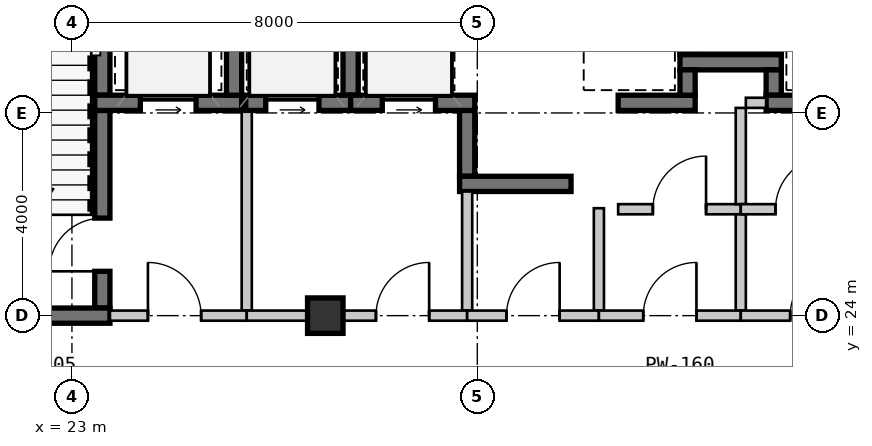
"""IFC4 building model, lengths in metres.
Left out: names, types, materials, properties, quantities, classifications, styles, units other than length and angle.
Written with IfcOpenShell. Run it as: python <this file> out.ifc"""

import sys

from ifc_helpers import new_model, si_unit, direction, frame, frame_2d, origin, origin_2d, place, context, subcontext, project, spatial, rectangle, extrude, source, transform, mapped, element, fill, save


model = new_model("IFC4")
c1 = context("Model", 3, precision=1e-05, world=origin(), true_north=direction((0.0, 1.0)))
c2 = subcontext(c1, "Body", "Model", "MODEL_VIEW")
j1 = project(units=[si_unit("LENGTHUNIT", "METRE"), si_unit("PLANEANGLEUNIT", "RADIAN")], contexts=[c1])
p1 = place(None, origin())
s1 = spatial("IfcSite", under=j1, at=p1, CompositionType="ELEMENT")
p2 = place(p1, origin())
s2 = spatial("IfcBuilding", under=s1, at=p2, CompositionType="ELEMENT")
p3 = place(p2, frame((0.0, 0.0, 65.1)))
s3 = spatial("IfcBuildingStorey", under=s2, at=p3, CompositionType="ELEMENT", Elevation=65.1)
m1 = source(origin(), c2, "Body", "SweptSolid", [
    extrude(rectangle(XDim=0.7, YDim=0.7, at=origin_2d()), origin(), (0.0, 0.0, 1.0), 3.15),
])
p4 = place(p3, frame((28.0, 24.0, 0.0), z_axis=(0.0, 0.0, 1.0), x_axis=(1.0, 0.0, 0.0)))
e1 = element("IfcColumn", 1, at=p4, inside=s3, PredefinedType="COLUMN", context=c2, shape_type="MappedRepresentation", body=[
    mapped(m1, transform((0.0, 0.0, 0.0), scale=1.0)),
])
m2 = source(origin(), c2, "Body", "SweptSolid", [
    extrude(rectangle(XDim=3.5, YDim=0.3, at=frame_2d((1.75, 0.0))), origin(), (0.0, 0.0, 1.0), 2.93),
])
p5 = place(p3, frame((23.6, 28.35, 0.0), z_axis=(0.0, 0.0, 1.0), x_axis=(0.0, 1.0, 0.0)))
e2 = element("IfcWall", 2, at=p5, inside=s3, PredefinedType="SHEAR", context=c2, shape_type="MappedRepresentation", body=[
    mapped(m2, transform((0.0, 0.0, 0.0), scale=1.0)),
])
m3 = source(origin(), c2, "Body", "SweptSolid", [
    extrude(rectangle(XDim=3.9, YDim=0.3, at=frame_2d((1.95, 0.0))), origin(), (0.0, 0.0, 1.0), 2.93),
])
p6 = place(p3, frame((23.6, 24.15, 0.0), z_axis=(0.0, 0.0, 1.0), x_axis=(0.0, 1.0, 0.0)))
e3 = element("IfcWall", 3, at=p6, inside=s3, PredefinedType="SHEAR", context=c2, shape_type="MappedRepresentation", body=[
    mapped(m3, transform((0.0, 0.0, 0.0), scale=1.0)),
])
m4 = source(origin(), c2, "Body", "SweptSolid", [
    extrude(rectangle(XDim=1.05, YDim=2.1, at=frame_2d((0.525, 1.05))), frame((0.0, 0.16, 0.0), z_axis=(0.0, -1.0, 0.0), x_axis=(1.0, 0.0, 0.0)), (0.0, 0.0, 1.0), 0.32),
])
p7 = place(p6, frame((0.725, 0.0, 0.0)))
e4 = element("IfcOpeningElement", 4, at=p7, cuts=e3, PredefinedType="OPENING", context=c2, shape_type="MappedRepresentation", body=[
    mapped(m4, transform((0.0, 0.0, 0.0), scale=1.0)),
])
m5 = source(origin(), c2, "Body", "SweptSolid", [
    extrude(rectangle(XDim=4.9, YDim=0.3, at=frame_2d((2.45, 0.0))), origin(), (0.0, 0.0, 1.0), 2.93),
])
p8 = place(p3, frame((18.85, 24.0, 0.0), z_axis=(0.0, 0.0, 1.0), x_axis=(1.0, 0.0, 0.0)))
e5 = element("IfcWall", 5, at=p8, inside=s3, PredefinedType="SHEAR", context=c2, shape_type="MappedRepresentation", body=[
    mapped(m5, transform((0.0, 0.0, 0.0), scale=1.0)),
])
m6 = source(origin(), c2, "Body", "SweptSolid", [
    extrude(rectangle(XDim=2.9, YDim=0.3, at=frame_2d((1.45, 0.0))), origin(), (0.0, 0.0, 1.0), 2.93),
])
p9 = place(p3, frame((23.45, 28.2, 0.0), z_axis=(0.0, 0.0, 1.0), x_axis=(1.0, 0.0, 0.0)))
e6 = element("IfcWall", 6, at=p9, inside=s3, PredefinedType="SHEAR", context=c2, shape_type="MappedRepresentation", body=[
    mapped(m6, transform((0.0, 0.0, 0.0), scale=1.0)),
])
m7 = source(origin(), c2, "Body", "SweptSolid", [
    extrude(rectangle(XDim=1.1, YDim=2.15, at=frame_2d((0.55, 1.075))), frame((0.0, 0.16, 0.0), z_axis=(0.0, -1.0, 0.0), x_axis=(1.0, 0.0, 0.0)), (0.0, 0.0, 1.0), 0.32),
])
p10 = place(p9, frame((0.9, 0.0, 0.0)))
e7 = element("IfcOpeningElement", 7, at=p10, cuts=e6, PredefinedType="OPENING", context=c2, shape_type="MappedRepresentation", body=[
    mapped(m7, transform((0.0, 0.0, 0.0), scale=1.0)),
])
p11 = place(p3, frame((26.2, 28.35, 0.0), z_axis=(0.0, 0.0, 1.0), x_axis=(0.0, 1.0, 0.0)))
e8 = element("IfcWall", 8, at=p11, inside=s3, PredefinedType="SHEAR", context=c2, shape_type="MappedRepresentation", body=[
    mapped(m2, transform((0.0, 0.0, 0.0), scale=1.0)),
])
m8 = source(origin(), c2, "Body", "SweptSolid", [
    extrude(rectangle(XDim=3.95, YDim=0.2, at=frame_2d((1.975, 0.0))), origin(), (0.0, 0.0, 1.0), 2.93),
])
p12 = place(p3, frame((26.45, 24.1, 0.0), z_axis=(0.0, 0.0, 1.0), x_axis=(0.0, 1.0, 0.0)))
e9 = element("IfcWall", 9, at=p12, inside=s3, PredefinedType="SOLIDWALL", context=c2, shape_type="MappedRepresentation", body=[
    mapped(m8, transform((0.0, 0.0, 0.0), scale=1.0)),
])
m9 = source(origin(), c2, "Body", "SweptSolid", [
    extrude(rectangle(XDim=2.7, YDim=0.2, at=frame_2d((1.35, 0.0))), origin(), (0.0, 0.0, 1.0), 2.47),
])
p13 = place(p3, frame((23.75, 24.0, 0.0), z_axis=(0.0, 0.0, 1.0), x_axis=(1.0, 0.0, 0.0)))
e10 = element("IfcWall", 10, at=p13, inside=s3, PredefinedType="SOLIDWALL", context=c2, shape_type="MappedRepresentation", body=[
    mapped(m9, transform((0.0, 0.0, 0.0), scale=1.0)),
])
m10 = source(origin(), c2, "Body", "SweptSolid", [
    extrude(rectangle(XDim=1.05, YDim=2.1, at=frame_2d((0.525, 1.05))), frame((0.0, 0.11, 0.0), z_axis=(0.0, -1.0, 0.0), x_axis=(1.0, 0.0, 0.0)), (0.0, 0.0, 1.0), 0.22),
])
p14 = place(p13, frame((0.75, 0.0, 0.0)))
e11 = element("IfcOpeningElement", 11, at=p14, cuts=e10, PredefinedType="OPENING", context=c2, shape_type="MappedRepresentation", body=[
    mapped(m10, transform((0.0, 0.0, 0.0), scale=1.0)),
])
m11 = source(origin(), c2, "Body", "SweptSolid", [
    extrude(rectangle(XDim=1.2, YDim=0.3, at=frame_2d((0.6, 0.0))), origin(), (0.0, 0.0, 1.0), 2.93),
])
for number, where, z_axis, x_axis in (
    (12, (35.15, 30.35, 0.0), (0.0, 0.0, 1.0), (0.0, -1.0, 0.0)),
    (13, (36.85, 29.15, 0.0), (0.0, 0.0, 1.0), (0.0, 1.0, 0.0)),
):
    element("IfcWall", number, at=place(p3, frame(where, z_axis=z_axis, x_axis=x_axis)), inside=s3, PredefinedType="SHEAR", context=c2, shape_type="MappedRepresentation", body=[
        mapped(m11, transform((0.0, 0.0, 0.0), scale=1.0)),
    ])
m12 = source(origin(), c2, "Body", "SweptSolid", [
    extrude(rectangle(XDim=2.0, YDim=0.3, at=frame_2d((1.0, 0.0))), origin(), (0.0, 0.0, 1.0), 2.93),
])
p15 = place(p3, frame((35.0, 29.0, 0.0), z_axis=(0.0, 0.0, 1.0), x_axis=(1.0, 0.0, 0.0)))
e14 = element("IfcWall", 14, at=p15, inside=s3, PredefinedType="SHEAR", context=c2, shape_type="MappedRepresentation", body=[
    mapped(m12, transform((0.0, 0.0, 0.0), scale=1.0)),
])
m13 = source(origin(), c2, "Body", "SweptSolid", [
    extrude(rectangle(XDim=1.3, YDim=0.3, at=frame_2d((0.65, 0.0))), origin(), (0.0, 0.0, 1.0), 2.93),
])
p16 = place(p3, frame((30.8, 28.05, 0.0), z_axis=(0.0, 0.0, 1.0), x_axis=(0.0, -1.0, 0.0)))
e15 = element("IfcWall", 15, at=p16, inside=s3, PredefinedType="SHEAR", context=c2, shape_type="MappedRepresentation", body=[
    mapped(m13, transform((0.0, 0.0, 0.0), scale=1.0)),
])
m14 = source(origin(), c2, "Body", "SweptSolid", [
    extrude(rectangle(XDim=2.2, YDim=0.3, at=frame_2d((1.1, 0.0))), origin(), (0.0, 0.0, 1.0), 2.93),
])
p17 = place(p3, frame((30.65, 26.6, 0.0), z_axis=(0.0, 0.0, 1.0), x_axis=(1.0, 0.0, 0.0)))
e16 = element("IfcWall", 16, at=p17, inside=s3, PredefinedType="SHEAR", context=c2, shape_type="MappedRepresentation", body=[
    mapped(m14, transform((0.0, 0.0, 0.0), scale=1.0)),
])
p18 = place(p3, frame((28.5, 28.35, 0.0), z_axis=(0.0, 0.0, 1.0), x_axis=(0.0, 1.0, 0.0)))
e17 = element("IfcWall", 17, at=p18, inside=s3, PredefinedType="SHEAR", context=c2, shape_type="MappedRepresentation", body=[
    mapped(m2, transform((0.0, 0.0, 0.0), scale=1.0)),
])
m15 = source(origin(), c2, "Body", "SweptSolid", [
    extrude(rectangle(XDim=2.07, YDim=0.3, at=frame_2d((1.035, 0.0))), origin(), (0.0, 0.0, 1.0), 2.93),
])
p19 = place(p3, frame((26.43, 28.2, 0.0), z_axis=(0.0, 0.0, 1.0), x_axis=(1.0, 0.0, 0.0)))
e18 = element("IfcWall", 18, at=p19, inside=s3, PredefinedType="SHEAR", context=c2, shape_type="MappedRepresentation", body=[
    mapped(m15, transform((0.0, 0.0, 0.0), scale=1.0)),
])
m16 = source(origin(), c2, "Body", "SweptSolid", [
    extrude(rectangle(XDim=1.05, YDim=2.15, at=frame_2d((0.525, 1.075))), frame((0.0, 0.16, 0.0), z_axis=(0.0, -1.0, 0.0), x_axis=(1.0, 0.0, 0.0)), (0.0, 0.0, 1.0), 0.32),
])
p20 = place(p19, frame((0.395, 0.0, 0.0)))
e19 = element("IfcOpeningElement", 19, at=p20, cuts=e18, PredefinedType="OPENING", context=c2, shape_type="MappedRepresentation", body=[
    mapped(m16, transform((0.0, 0.0, 0.0), scale=1.0)),
])
m17 = source(origin(), c2, "Body", "SweptSolid", [
    extrude(rectangle(XDim=2.45, YDim=0.3, at=frame_2d((1.225, 0.0))), origin(), (0.0, 0.0, 1.0), 2.93),
])
p21 = place(p3, frame((28.5, 28.2, 0.0), z_axis=(0.0, 0.0, 1.0), x_axis=(1.0, 0.0, 0.0)))
e20 = element("IfcWall", 20, at=p21, inside=s3, PredefinedType="SHEAR", context=c2, shape_type="MappedRepresentation", body=[
    mapped(m17, transform((0.0, 0.0, 0.0), scale=1.0)),
])
p22 = place(p21, frame((0.625, 0.0, 0.0)))
e21 = element("IfcOpeningElement", 21, at=p22, cuts=e20, PredefinedType="OPENING", context=c2, shape_type="MappedRepresentation", body=[
    mapped(m16, transform((0.0, 0.0, 0.0), scale=1.0)),
])
m18 = source(origin(), c2, "Body", "SweptSolid", [
    extrude(rectangle(XDim=2.35, YDim=0.2, at=frame_2d((1.175, 0.0))), origin(), (0.0, 0.0, 1.0), 2.93),
])
p23 = place(p3, frame((30.8, 26.45, 0.0), z_axis=(0.0, 0.0, 1.0), x_axis=(0.0, -1.0, 0.0)))
e22 = element("IfcWall", 22, at=p23, inside=s3, PredefinedType="SOLIDWALL", context=c2, shape_type="MappedRepresentation", body=[
    mapped(m18, transform((0.0, 0.0, 0.0), scale=1.0)),
])
m19 = source(origin(), c2, "Body", "SweptSolid", [
    extrude(rectangle(XDim=4.35, YDim=0.2, at=frame_2d((2.175, 0.0))), origin(), (0.0, 0.0, 1.0), 2.47),
])
p24 = place(p3, frame((30.8, 24.0, 0.0), z_axis=(0.0, 0.0, 1.0), x_axis=(-1.0, 0.0, 0.0)))
e23 = element("IfcWall", 23, at=p24, inside=s3, PredefinedType="SOLIDWALL", context=c2, shape_type="MappedRepresentation", body=[
    mapped(m19, transform((0.0, 0.0, 0.0), scale=1.0)),
])
p25 = place(p24, frame((0.75, 0.0, 0.0)))
e24 = element("IfcOpeningElement", 24, at=p25, cuts=e23, PredefinedType="OPENING", context=c2, shape_type="MappedRepresentation", body=[
    mapped(m10, transform((0.0, 0.0, 0.0), scale=1.0)),
])
m20 = source(origin(), c2, "Body", "SweptSolid", [
    extrude(rectangle(XDim=1.52, YDim=0.3, at=frame_2d((0.76, 0.0))), origin(), (0.0, 0.0, 1.0), 2.93),
])
p26 = place(p3, frame((33.78, 28.2, 0.0), z_axis=(0.0, 0.0, 1.0), x_axis=(1.0, 0.0, 0.0)))
e25 = element("IfcWall", 25, at=p26, inside=s3, PredefinedType="SHEAR", context=c2, shape_type="MappedRepresentation", body=[
    mapped(m20, transform((0.0, 0.0, 0.0), scale=1.0)),
])
m21 = source(origin(), c2, "Body", "SweptSolid", [
    extrude(rectangle(XDim=0.5, YDim=0.3, at=frame_2d((0.25, 0.0))), origin(), (0.0, 0.0, 1.0), 2.93),
])
for number, where, z_axis, x_axis in (
    (26, (35.15, 28.35, 0.0), (0.0, 0.0, 1.0), (0.0, 1.0, 0.0)),
    (27, (36.85, 28.85, 0.0), (0.0, 0.0, 1.0), (0.0, -1.0, 0.0)),
):
    element("IfcWall", number, at=place(p3, frame(where, z_axis=z_axis, x_axis=x_axis)), inside=s3, PredefinedType="SHEAR", context=c2, shape_type="MappedRepresentation", body=[
        mapped(m21, transform((0.0, 0.0, 0.0), scale=1.0)),
    ])
m22 = source(origin(), c2, "Body", "SweptSolid", [
    extrude(rectangle(XDim=1.92, YDim=0.3, at=frame_2d((0.96, 0.0))), origin(), (0.0, 0.0, 1.0), 2.93),
])
p27 = place(p3, frame((36.7, 28.2, 0.0), z_axis=(0.0, 0.0, 1.0), x_axis=(1.0, 0.0, 0.0)))
e28 = element("IfcWall", 28, at=p27, inside=s3, PredefinedType="SHEAR", context=c2, shape_type="MappedRepresentation", body=[
    mapped(m22, transform((0.0, 0.0, 0.0), scale=1.0)),
])
m23 = source(origin(), c2, "Body", "SweptSolid", [
    extrude(rectangle(XDim=2.02, YDim=0.2, at=frame_2d((1.01, 0.0))), origin(), (0.0, 0.0, 1.0), 2.93),
])
p28 = place(p3, frame((33.4, 26.12, 0.0), z_axis=(0.0, 0.0, 1.0), x_axis=(0.0, -1.0, 0.0)))
e29 = element("IfcWall", 29, at=p28, inside=s3, PredefinedType="SOLIDWALL", context=c2, shape_type="MappedRepresentation", body=[
    mapped(m23, transform((0.0, 0.0, 0.0), scale=1.0)),
])
m24 = source(origin(), c2, "Body", "SweptSolid", [
    extrude(rectangle(XDim=2.6, YDim=0.2, at=frame_2d((1.3, 0.0))), origin(), (0.0, 0.0, 1.0), 2.47),
])
p29 = place(p3, frame((33.4, 24.0, 0.0), z_axis=(0.0, 0.0, 1.0), x_axis=(-1.0, 0.0, 0.0)))
e30 = element("IfcWall", 30, at=p29, inside=s3, PredefinedType="SOLIDWALL", context=c2, shape_type="MappedRepresentation", body=[
    mapped(m24, transform((0.0, 0.0, 0.0), scale=1.0)),
])
p30 = place(p29, frame((0.775, 0.0, 0.0)))
e31 = element("IfcOpeningElement", 31, at=p30, cuts=e30, PredefinedType="OPENING", context=c2, shape_type="MappedRepresentation", body=[
    mapped(m10, transform((0.0, 0.0, 0.0), scale=1.0)),
])
m25 = source(origin(), c2, "Body", "SweptSolid", [
    extrude(rectangle(XDim=2.42, YDim=0.2, at=frame_2d((1.21, 0.0))), origin(), (0.0, 0.0, 1.0), 2.93),
])
p31 = place(p3, frame((33.78, 26.1, 0.0), z_axis=(0.0, 0.0, 1.0), x_axis=(1.0, 0.0, 0.0)))
e32 = element("IfcWall", 32, at=p31, inside=s3, PredefinedType="SOLIDWALL", context=c2, shape_type="MappedRepresentation", body=[
    mapped(m25, transform((0.0, 0.0, 0.0), scale=1.0)),
])
p32 = place(p31, frame((0.685, 0.0, 0.0)))
e33 = element("IfcOpeningElement", 33, at=p32, cuts=e32, PredefinedType="OPENING", context=c2, shape_type="MappedRepresentation", body=[
    mapped(m10, transform((0.0, 0.0, 0.0), scale=1.0)),
])
m26 = source(origin(), c2, "Body", "SweptSolid", [
    extrude(rectangle(XDim=1.9, YDim=0.2, at=frame_2d((0.95, 0.0))), origin(), (0.0, 0.0, 1.0), 2.93),
])
p33 = place(p3, frame((36.2, 26.0, 0.0), z_axis=(0.0, 0.0, 1.0), x_axis=(0.0, -1.0, 0.0)))
e34 = element("IfcWall", 34, at=p33, inside=s3, PredefinedType="SOLIDWALL", context=c2, shape_type="MappedRepresentation", body=[
    mapped(m26, transform((0.0, 0.0, 0.0), scale=1.0)),
])
m27 = source(origin(), c2, "Body", "SweptSolid", [
    extrude(rectangle(XDim=2.8, YDim=0.2, at=frame_2d((1.4, 0.0))), origin(), (0.0, 0.0, 1.0), 2.47),
])
p34 = place(p3, frame((36.2, 24.0, 0.0), z_axis=(0.0, 0.0, 1.0), x_axis=(-1.0, 0.0, 0.0)))
e35 = element("IfcWall", 35, at=p34, inside=s3, PredefinedType="SOLIDWALL", context=c2, shape_type="MappedRepresentation", body=[
    mapped(m27, transform((0.0, 0.0, 0.0), scale=1.0)),
])
p35 = place(p34, frame((0.875, 0.0, 0.0)))
e36 = element("IfcOpeningElement", 36, at=p35, cuts=e35, PredefinedType="OPENING", context=c2, shape_type="MappedRepresentation", body=[
    mapped(m10, transform((0.0, 0.0, 0.0), scale=1.0)),
])
m28 = source(origin(), c2, "Body", "SweptSolid", [
    extrude(rectangle(XDim=1.9, YDim=0.2, at=frame_2d((0.95, 0.0))), origin(), (0.0, 0.0, 1.0), 2.93),
])
p36 = place(p3, frame((36.2, 28.1, 0.0), z_axis=(0.0, 0.0, 1.0), x_axis=(0.0, -1.0, 0.0)))
e37 = element("IfcWall", 37, at=p36, inside=s3, PredefinedType="SOLIDWALL", context=c2, shape_type="MappedRepresentation", body=[
    mapped(m28, transform((0.0, 0.0, 0.0), scale=1.0)),
])
m29 = source(origin(), c2, "Body", "SweptSolid", [
    extrude(rectangle(XDim=0.4, YDim=0.2, at=frame_2d((0.2, 0.0))), origin(), (0.0, 0.0, 1.0), 2.93),
])
p37 = place(p3, frame((36.7, 28.2, 0.0), z_axis=(0.0, 0.0, 1.0), x_axis=(-1.0, 0.0, 0.0)))
e38 = element("IfcWall", 38, at=p37, inside=s3, PredefinedType="SOLIDWALL", context=c2, shape_type="MappedRepresentation", body=[
    mapped(m29, transform((0.0, 0.0, 0.0), scale=1.0)),
])
m30 = source(origin(), c2, "Body", "SweptSolid", [
    extrude(rectangle(XDim=2.42, YDim=0.2, at=frame_2d((1.21, 0.0))), origin(), (0.0, 0.0, 1.0), 2.93),
])
p38 = place(p3, frame((36.2, 26.1, 0.0), z_axis=(0.0, 0.0, 1.0), x_axis=(1.0, 0.0, 0.0)))
e39 = element("IfcWall", 39, at=p38, inside=s3, PredefinedType="SOLIDWALL", context=c2, shape_type="MappedRepresentation", body=[
    mapped(m30, transform((0.0, 0.0, 0.0), scale=1.0)),
])
p39 = place(p38, frame((0.685, 0.0, 0.0)))
e40 = element("IfcOpeningElement", 40, at=p39, cuts=e39, PredefinedType="OPENING", context=c2, shape_type="MappedRepresentation", body=[
    mapped(m10, transform((0.0, 0.0, 0.0), scale=1.0)),
])
m31 = source(origin(), c2, "Body", "SweptSolid", [
    extrude(rectangle(XDim=3.0, YDim=0.2, at=frame_2d((1.5, 0.0))), origin(), (0.0, 0.0, 1.0), 2.47),
])
p40 = place(p3, frame((39.2, 24.0, 0.0), z_axis=(0.0, 0.0, 1.0), x_axis=(-1.0, 0.0, 0.0)))
e41 = element("IfcWall", 41, at=p40, inside=s3, PredefinedType="SOLIDWALL", context=c2, shape_type="MappedRepresentation", body=[
    mapped(m31, transform((0.0, 0.0, 0.0), scale=1.0)),
])
p41 = place(p40, frame((0.975, 0.0, 0.0)))
e42 = element("IfcOpeningElement", 42, at=p41, cuts=e41, PredefinedType="OPENING", context=c2, shape_type="MappedRepresentation", body=[
    mapped(m10, transform((0.0, 0.0, 0.0), scale=1.0)),
])
m32 = source(origin(), c2, "Body", "SweptSolid", [
    extrude(rectangle(XDim=1.05, YDim=2.1, at=frame_2d((0.525, 1.05))), frame((0.0, 0.025, 0.0), z_axis=(0.0, -1.0, 0.0), x_axis=(1.0, 0.0, 0.0)), (0.0, 0.0, 1.0), 0.05),
])
p42 = place(p7, origin())
e43 = element("IfcDoor", 43, at=p42, inside=s3, OperationType="SINGLE_SWING_LEFT", PredefinedType="DOOR", context=c2, shape_type="MappedRepresentation", body=[
    mapped(m32, transform((0.0, 0.0, 0.0), scale=1.0)),
])
fill(e4, e43)
m33 = source(origin(), c2, "Body", "SweptSolid", [
    extrude(rectangle(XDim=1.1, YDim=2.15, at=frame_2d((0.55, 1.075))), frame((0.0, 0.025, 0.0), z_axis=(0.0, -1.0, 0.0), x_axis=(1.0, 0.0, 0.0)), (0.0, 0.0, 1.0), 0.05),
])
p43 = place(p10, origin())
e44 = element("IfcDoor", 44, at=p43, inside=s3, OperationType="SLIDING_TO_LEFT", PredefinedType="DOOR", context=c2, shape_type="MappedRepresentation", body=[
    mapped(m33, transform((0.0, 0.0, 0.0), scale=1.0)),
])
fill(e7, e44)
p44 = place(p14, origin())
e45 = element("IfcDoor", 45, at=p44, inside=s3, OperationType="SINGLE_SWING_LEFT", PredefinedType="DOOR", context=c2, shape_type="MappedRepresentation", body=[
    mapped(m32, transform((0.0, 0.0, 0.0), scale=1.0)),
])
fill(e11, e45)
m34 = source(origin(), c2, "Body", "SweptSolid", [
    extrude(rectangle(XDim=1.05, YDim=2.15, at=frame_2d((0.525, 1.075))), frame((0.0, 0.025, 0.0), z_axis=(0.0, -1.0, 0.0), x_axis=(1.0, 0.0, 0.0)), (0.0, 0.0, 1.0), 0.05),
])
p45 = place(p20, origin())
e46 = element("IfcDoor", 46, at=p45, inside=s3, OperationType="SLIDING_TO_LEFT", PredefinedType="DOOR", context=c2, shape_type="MappedRepresentation", body=[
    mapped(m34, transform((0.0, 0.0, 0.0), scale=1.0)),
])
fill(e19, e46)
p46 = place(p22, origin())
e47 = element("IfcDoor", 47, at=p46, inside=s3, OperationType="SLIDING_TO_LEFT", PredefinedType="DOOR", context=c2, shape_type="MappedRepresentation", body=[
    mapped(m34, transform((0.0, 0.0, 0.0), scale=1.0)),
])
fill(e21, e47)
p47 = place(p25, frame((1.05, 0.0, 0.0), z_axis=(0.0, 0.0, 1.0), x_axis=(-1.0, 0.0, 0.0)))
e48 = element("IfcDoor", 48, at=p47, inside=s3, OperationType="SINGLE_SWING_RIGHT", PredefinedType="DOOR", context=c2, shape_type="MappedRepresentation", body=[
    mapped(m32, transform((0.0, 0.0, 0.0), scale=1.0)),
])
fill(e24, e48)
p48 = place(p30, frame((1.05, 0.0, 0.0), z_axis=(0.0, 0.0, 1.0), x_axis=(-1.0, 0.0, 0.0)))
e49 = element("IfcDoor", 49, at=p48, inside=s3, OperationType="SINGLE_SWING_RIGHT", PredefinedType="DOOR", context=c2, shape_type="MappedRepresentation", body=[
    mapped(m32, transform((0.0, 0.0, 0.0), scale=1.0)),
])
fill(e31, e49)
p49 = place(p32, origin())
e50 = element("IfcDoor", 50, at=p49, inside=s3, OperationType="SINGLE_SWING_RIGHT", PredefinedType="DOOR", context=c2, shape_type="MappedRepresentation", body=[
    mapped(m32, transform((0.0, 0.0, 0.0), scale=1.0)),
])
fill(e33, e50)
p50 = place(p35, frame((1.05, 0.0, 0.0), z_axis=(0.0, 0.0, 1.0), x_axis=(-1.0, 0.0, 0.0)))
e51 = element("IfcDoor", 51, at=p50, inside=s3, OperationType="SINGLE_SWING_RIGHT", PredefinedType="DOOR", context=c2, shape_type="MappedRepresentation", body=[
    mapped(m32, transform((0.0, 0.0, 0.0), scale=1.0)),
])
fill(e36, e51)
p51 = place(p39, origin())
e52 = element("IfcDoor", 52, at=p51, inside=s3, OperationType="SINGLE_SWING_RIGHT", PredefinedType="DOOR", context=c2, shape_type="MappedRepresentation", body=[
    mapped(m32, transform((0.0, 0.0, 0.0), scale=1.0)),
])
fill(e40, e52)
p52 = place(p41, frame((1.05, 0.0, 0.0), z_axis=(0.0, 0.0, 1.0), x_axis=(-1.0, 0.0, 0.0)))
e53 = element("IfcDoor", 53, at=p52, inside=s3, OperationType="SINGLE_SWING_RIGHT", PredefinedType="DOOR", context=c2, shape_type="MappedRepresentation", body=[
    mapped(m32, transform((0.0, 0.0, 0.0), scale=1.0)),
])
fill(e42, e53)
save(model, sys.argv[1])
